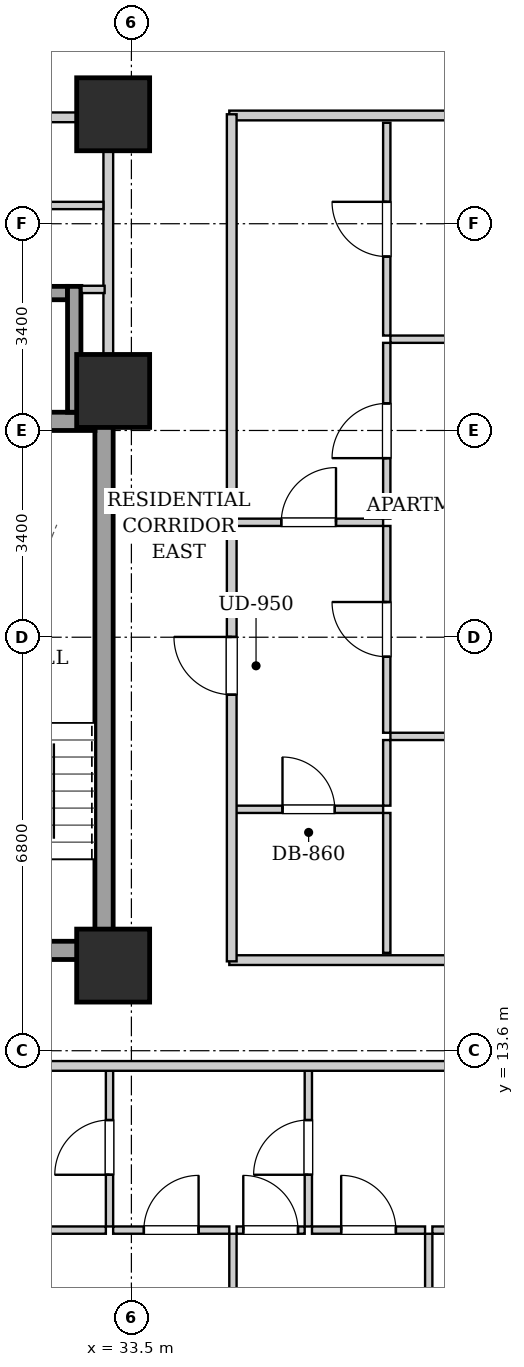
"""IFC4 building model, lengths in metres.
Left out: names, types, materials, properties, quantities, classifications, styles, units other than length and angle.
Written with IfcOpenShell. Run it as: python <this file> out.ifc"""

import sys

from ifc_helpers import new_model, si_unit, direction, frame, frame_2d, origin, origin_2d, place, context, subcontext, project, spatial, rectangle, extrude, element, fill, save


model = new_model("IFC4")
c1 = context("Model", 3, precision=1e-05, world=origin(), true_north=direction((0.0, 1.0)))
c2 = subcontext(c1, "Body", "Model", "MODEL_VIEW")
j1 = project(units=[si_unit("LENGTHUNIT", "METRE"), si_unit("PLANEANGLEUNIT", "RADIAN")], contexts=[c1])
p1 = place(None, origin())
s1 = spatial("IfcSite", under=j1, at=p1, CompositionType="ELEMENT")
p2 = place(p1, origin())
s2 = spatial("IfcBuilding", under=s1, at=p2, CompositionType="ELEMENT")
p3 = place(p2, frame((0.0, 0.0, 38.6)))
s3 = spatial("IfcBuildingStorey", under=s2, at=p3, CompositionType="ELEMENT", Elevation=38.6)
for number, where, z_axis, x_axis in (
    (1, (33.2, 15.0, 0.0), (0.0, 0.0, 1.0), (1.0, 0.0, 0.0)),
    (2, (33.2, 29.0, 0.0), (0.0, 0.0, 1.0), (1.0, 0.0, 0.0)),
    (3, (33.2, 24.45, 0.0), (0.0, 0.0, 1.0), (1.0, 0.0, 0.0)),
):
    element("IfcColumn", number, at=place(p3, frame(where, z_axis=z_axis, x_axis=x_axis)), inside=s3, PredefinedType="COLUMN", context=c2, shape_type="SweptSolid", body=[
        extrude(rectangle(XDim=1.2, YDim=1.2, at=origin_2d()), origin(), (0.0, 0.0, 1.0), 3.2),
    ])
p4 = place(p3, frame((33.05, 15.1, 0.0), z_axis=(0.0, 0.0, 1.0), x_axis=(0.0, 1.0, 0.0)))
e4 = element("IfcWall", 4, at=p4, inside=s3, PredefinedType="SHEAR", context=c2, shape_type="SweptSolid", body=[
    extrude(rectangle(XDim=9.0, YDim=0.3, at=frame_2d((4.5, 0.0))), origin(), (0.0, 0.0, 1.0), 2.94),
])
p5 = place(p3, frame((30.05, 23.95, 0.0), z_axis=(0.0, 0.0, 1.0), x_axis=(1.0, 0.0, 0.0)))
e5 = element("IfcWall", 5, at=p5, inside=s3, PredefinedType="SHEAR", context=c2, shape_type="SweptSolid", body=[
    extrude(rectangle(XDim=2.85, YDim=0.3, at=frame_2d((1.425, 0.0))), origin(), (0.0, 0.0, 1.0), 2.94),
])
p6 = place(p3, frame((30.05, 15.25, 0.0), z_axis=(0.0, 0.0, 1.0), x_axis=(1.0, 0.0, 0.0)))
e6 = element("IfcWall", 6, at=p6, inside=s3, PredefinedType="SHEAR", context=c2, shape_type="SweptSolid", body=[
    extrude(rectangle(XDim=2.85, YDim=0.3, at=frame_2d((1.425, 0.0))), origin(), (0.0, 0.0, 1.0), 2.94),
])
p7 = place(p6, frame((0.86, 0.0, 0.0)))
e7 = element("IfcOpeningElement", 7, at=p7, cuts=e6, PredefinedType="OPENING", context=c2, shape_type="SweptSolid", body=[
    extrude(rectangle(XDim=1.1, YDim=2.05, at=frame_2d((0.55, 1.025))), frame((0.0, 0.16, 0.0), z_axis=(0.0, -1.0, 0.0), x_axis=(1.0, 0.0, 0.0)), (0.0, 0.0, 1.0), 0.32),
])
p8 = place(p3, frame((30.55, 26.06, 0.0), z_axis=(0.0, 0.0, 1.0), x_axis=(1.0, 0.0, 0.0)))
e8 = element("IfcWall", 8, at=p8, inside=s3, PredefinedType="SHEAR", context=c2, shape_type="SweptSolid", body=[
    extrude(rectangle(XDim=1.9, YDim=0.22, at=frame_2d((0.95, 0.0))), origin(), (0.0, 0.0, 1.0), 2.94),
])
p9 = place(p3, frame((32.56, 24.1, 0.0), z_axis=(0.0, 0.0, 1.0), x_axis=(0.0, 1.0, 0.0)))
e9 = element("IfcWall", 9, at=p9, inside=s3, PredefinedType="SHEAR", context=c2, shape_type="SweptSolid", body=[
    extrude(rectangle(XDim=2.07, YDim=0.22, at=frame_2d((1.035, 0.0))), origin(), (0.0, 0.0, 1.0), 2.94),
])
p10 = place(p3, frame((33.12, 24.12, 0.0), z_axis=(0.0, 0.0, 1.0), x_axis=(0.0, 1.0, 0.0)))
e10 = element("IfcWall", 10, at=p10, inside=s3, PredefinedType="PARTITIONING", context=c2, shape_type="SweptSolid", body=[
    extrude(rectangle(XDim=4.76, YDim=0.16, at=frame_2d((2.38, 0.0))), origin(), (0.0, 0.0, 1.0), 2.275),
])
p11 = place(p3, frame((32.68, 26.12, 0.0), z_axis=(0.0, 0.0, 1.0), x_axis=(1.0, 0.0, 0.0)))
e11 = element("IfcWall", 11, at=p11, inside=s3, PredefinedType="PARTITIONING", context=c2, shape_type="SweptSolid", body=[
    extrude(rectangle(XDim=0.38, YDim=0.12, at=frame_2d((0.19, 0.0))), origin(), (0.0, 0.0, 1.0), 2.94),
])
p12 = place(p3, frame((30.16, 27.5, 0.0), z_axis=(0.0, 0.0, 1.0), x_axis=(1.0, 0.0, 0.0)))
e12 = element("IfcWall", 12, at=p12, inside=s3, PredefinedType="PARTITIONING", context=c2, shape_type="SweptSolid", body=[
    extrude(rectangle(XDim=2.88, YDim=0.12, at=frame_2d((1.44, 0.0))), origin(), (0.0, 0.0, 1.0), 2.94),
])
p13 = place(p12, frame((0.97, 0.0, 0.0)))
e13 = element("IfcOpeningElement", 13, at=p13, cuts=e12, PredefinedType="OPENING", context=c2, shape_type="SweptSolid", body=[
    extrude(rectangle(XDim=0.86, YDim=2.05, at=frame_2d((0.43, 1.025))), frame((0.0, 0.07, 0.0), z_axis=(0.0, -1.0, 0.0), x_axis=(1.0, 0.0, 0.0)), (0.0, 0.0, 1.0), 0.14),
])
p14 = place(p3, frame((30.08, 28.95, 0.0), z_axis=(0.0, 0.0, 1.0), x_axis=(1.0, 0.0, 0.0)))
e14 = element("IfcWall", 14, at=p14, inside=s3, PredefinedType="PARTITIONING", context=c2, shape_type="SweptSolid", body=[
    extrude(rectangle(XDim=2.96, YDim=0.16, at=frame_2d((1.48, 0.0))), origin(), (0.0, 0.0, 1.0), 2.94),
])
p15 = place(p14, frame((1.045, 0.0, 0.0)))
e15 = element("IfcOpeningElement", 15, at=p15, cuts=e14, PredefinedType="OPENING", context=c2, shape_type="SweptSolid", body=[
    extrude(rectangle(XDim=0.86, YDim=2.05, at=frame_2d((0.43, 1.025))), frame((0.0, 0.09, 0.0), z_axis=(0.0, -1.0, 0.0), x_axis=(1.0, 0.0, 0.0)), (0.0, 0.0, 1.0), 0.18),
])
for number, where, z_axis, x_axis in (
    (16, (35.11, 15.09, 0.0), (0.0, 0.0, 1.0), (1.0, 0.0, 0.0)),
    (17, (35.11, 28.98, 0.0), (0.0, 0.0, 1.0), (1.0, 0.0, 0.0)),
):
    element("IfcWall", number, at=place(p3, frame(where, z_axis=z_axis, x_axis=x_axis)), inside=s3, PredefinedType="PARTITIONING", context=c2, shape_type="SweptSolid", body=[
        extrude(rectangle(XDim=11.11, YDim=0.16, at=frame_2d((5.555, 0.0))), origin(), (0.0, 0.0, 1.0), 2.155),
    ])
p16 = place(p3, frame((33.14, 10.71, 0.0), z_axis=(0.0, 0.0, 1.0), x_axis=(0.0, 1.0, 0.0)))
e18 = element("IfcWall", 18, at=p16, inside=s3, PredefinedType="PARTITIONING", context=c2, shape_type="SweptSolid", body=[
    extrude(rectangle(XDim=2.6, YDim=0.12, at=frame_2d((1.3, 0.0))), origin(), (0.0, 0.0, 1.0), 2.155),
])
p17 = place(p16, frame((0.85, 0.0, 0.0)))
e19 = element("IfcOpeningElement", 19, at=p17, cuts=e18, PredefinedType="OPENING", context=c2, shape_type="SweptSolid", body=[
    extrude(rectangle(XDim=0.9, YDim=2.05, at=frame_2d((0.45, 1.025))), frame((0.0, 0.07, 0.0), z_axis=(0.0, -1.0, 0.0), x_axis=(1.0, 0.0, 0.0)), (0.0, 0.0, 1.0), 0.14),
])
p18 = place(p3, frame((32.01, 10.65, 0.0), z_axis=(0.0, 0.0, 1.0), x_axis=(1.0, 0.0, 0.0)))
e20 = element("IfcWall", 20, at=p18, inside=s3, PredefinedType="PARTITIONING", context=c2, shape_type="SweptSolid", body=[
    extrude(rectangle(XDim=1.07, YDim=0.12, at=frame_2d((0.535, 0.0))), origin(), (0.0, 0.0, 1.0), 2.94),
])
p19 = place(p3, frame((36.41, 10.71, 0.0), z_axis=(0.0, 0.0, 1.0), x_axis=(0.0, 1.0, 0.0)))
e21 = element("IfcWall", 21, at=p19, inside=s3, PredefinedType="PARTITIONING", context=c2, shape_type="SweptSolid", body=[
    extrude(rectangle(XDim=2.6, YDim=0.12, at=frame_2d((1.3, 0.0))), origin(), (0.0, 0.0, 1.0), 2.94),
])
p20 = place(p19, frame((0.85, 0.0, 0.0)))
e22 = element("IfcOpeningElement", 22, at=p20, cuts=e21, PredefinedType="OPENING", context=c2, shape_type="SweptSolid", body=[
    extrude(rectangle(XDim=0.9, YDim=2.05, at=frame_2d((0.45, 1.025))), frame((0.0, 0.07, 0.0), z_axis=(0.0, -1.0, 0.0), x_axis=(1.0, 0.0, 0.0)), (0.0, 0.0, 1.0), 0.14),
])
p21 = place(p3, frame((33.2, 10.65, 0.0), z_axis=(0.0, 0.0, 1.0), x_axis=(1.0, 0.0, 0.0)))
e23 = element("IfcWall", 23, at=p21, inside=s3, PredefinedType="PARTITIONING", context=c2, shape_type="SweptSolid", body=[
    extrude(rectangle(XDim=1.91, YDim=0.12, at=frame_2d((0.955, 0.0))), origin(), (0.0, 0.0, 1.0), 2.94),
])
p22 = place(p21, frame((0.505, 0.0, 0.0)))
e24 = element("IfcOpeningElement", 24, at=p22, cuts=e23, PredefinedType="OPENING", context=c2, shape_type="SweptSolid", body=[
    extrude(rectangle(XDim=0.9, YDim=2.05, at=frame_2d((0.45, 1.025))), frame((0.0, 0.07, 0.0), z_axis=(0.0, -1.0, 0.0), x_axis=(1.0, 0.0, 0.0)), (0.0, 0.0, 1.0), 0.14),
])
p23 = place(p3, frame((35.23, 10.65, 0.0), z_axis=(0.0, 0.0, 1.0), x_axis=(1.0, 0.0, 0.0)))
e25 = element("IfcWall", 25, at=p23, inside=s3, PredefinedType="PARTITIONING", context=c2, shape_type="SweptSolid", body=[
    extrude(rectangle(XDim=1.12, YDim=0.12, at=frame_2d((0.56, 0.0))), origin(), (0.0, 0.0, 1.0), 2.94),
])
p24 = place(p23, frame((0.11, 0.0, 0.0)))
e26 = element("IfcOpeningElement", 26, at=p24, cuts=e25, PredefinedType="OPENING", context=c2, shape_type="SweptSolid", body=[
    extrude(rectangle(XDim=0.9, YDim=2.05, at=frame_2d((0.45, 1.025))), frame((0.0, 0.07, 0.0), z_axis=(0.0, -1.0, 0.0), x_axis=(1.0, 0.0, 0.0)), (0.0, 0.0, 1.0), 0.14),
])
p25 = place(p3, frame((36.47, 10.65, 0.0), z_axis=(0.0, 0.0, 1.0), x_axis=(1.0, 0.0, 0.0)))
e27 = element("IfcWall", 27, at=p25, inside=s3, PredefinedType="PARTITIONING", context=c2, shape_type="SweptSolid", body=[
    extrude(rectangle(XDim=1.86, YDim=0.12, at=frame_2d((0.93, 0.0))), origin(), (0.0, 0.0, 1.0), 2.94),
])
p26 = place(p25, frame((0.48, 0.0, 0.0)))
e28 = element("IfcOpeningElement", 28, at=p26, cuts=e27, PredefinedType="OPENING", context=c2, shape_type="SweptSolid", body=[
    extrude(rectangle(XDim=0.9, YDim=2.05, at=frame_2d((0.45, 1.025))), frame((0.0, 0.07, 0.0), z_axis=(0.0, -1.0, 0.0), x_axis=(1.0, 0.0, 0.0)), (0.0, 0.0, 1.0), 0.14),
])
p27 = place(p3, frame((38.45, 10.65, 0.0), z_axis=(0.0, 0.0, 1.0), x_axis=(1.0, 0.0, 0.0)))
e29 = element("IfcWall", 29, at=p27, inside=s3, PredefinedType="PARTITIONING", context=c2, shape_type="SweptSolid", body=[
    extrude(rectangle(XDim=1.62, YDim=0.12, at=frame_2d((0.81, 0.0))), origin(), (0.0, 0.0, 1.0), 2.94),
])
p28 = place(p27, frame((0.36, 0.0, 0.0)))
e30 = element("IfcOpeningElement", 30, at=p28, cuts=e29, PredefinedType="OPENING", context=c2, shape_type="SweptSolid", body=[
    extrude(rectangle(XDim=0.9, YDim=2.05, at=frame_2d((0.45, 1.025))), frame((0.0, 0.07, 0.0), z_axis=(0.0, -1.0, 0.0), x_axis=(1.0, 0.0, 0.0)), (0.0, 0.0, 1.0), 0.14),
])
p29 = place(p3, frame((35.17, 0.28, 0.0), z_axis=(0.0, 0.0, 1.0), x_axis=(0.0, 1.0, 0.0)))
e31 = element("IfcWall", 31, at=p29, inside=s3, PredefinedType="PARTITIONING", context=c2, shape_type="SweptSolid", body=[
    extrude(rectangle(XDim=10.31, YDim=0.12, at=frame_2d((5.155, 0.0))), origin(), (0.0, 0.0, 1.0), 2.94),
])
p30 = place(p29, frame((4.69, 0.0, 0.0)))
e32 = element("IfcOpeningElement", 32, at=p30, cuts=e31, PredefinedType="OPENING", context=c2, shape_type="SweptSolid", body=[
    extrude(rectangle(XDim=0.9, YDim=2.05, at=frame_2d((0.45, 1.025))), frame((0.0, 0.07, 0.0), z_axis=(0.0, -1.0, 0.0), x_axis=(1.0, 0.0, 0.0)), (0.0, 0.0, 1.0), 0.14),
])
p31 = place(p3, frame((38.39, 0.28, 0.0), z_axis=(0.0, 0.0, 1.0), x_axis=(0.0, 1.0, 0.0)))
e33 = element("IfcWall", 33, at=p31, inside=s3, PredefinedType="PARTITIONING", context=c2, shape_type="SweptSolid", body=[
    extrude(rectangle(XDim=10.31, YDim=0.12, at=frame_2d((5.155, 0.0))), origin(), (0.0, 0.0, 1.0), 2.94),
])
p32 = place(p31, frame((4.69, 0.0, 0.0)))
e34 = element("IfcOpeningElement", 34, at=p32, cuts=e33, PredefinedType="OPENING", context=c2, shape_type="SweptSolid", body=[
    extrude(rectangle(XDim=0.9, YDim=2.05, at=frame_2d((0.45, 1.025))), frame((0.0, 0.07, 0.0), z_axis=(0.0, -1.0, 0.0), x_axis=(1.0, 0.0, 0.0)), (0.0, 0.0, 1.0), 0.14),
])
p33 = place(p3, frame((35.19, 22.29, 0.0), z_axis=(0.0, 0.0, 1.0), x_axis=(1.0, 0.0, 0.0)))
e35 = element("IfcWall", 35, at=p33, inside=s3, PredefinedType="PARTITIONING", context=c2, shape_type="SweptSolid", body=[
    extrude(rectangle(XDim=2.45, YDim=0.12, at=frame_2d((1.225, 0.0))), origin(), (0.0, 0.0, 1.0), 2.94),
])
p34 = place(p33, frame((0.775, 0.0, 0.0)))
e36 = element("IfcOpeningElement", 36, at=p34, cuts=e35, PredefinedType="OPENING", context=c2, shape_type="SweptSolid", body=[
    extrude(rectangle(XDim=0.9, YDim=2.05, at=frame_2d((0.45, 1.025))), frame((0.0, 0.07, 0.0), z_axis=(0.0, -1.0, 0.0), x_axis=(1.0, 0.0, 0.0)), (0.0, 0.0, 1.0), 0.14),
])
p35 = place(p3, frame((37.7, 22.35, 0.0), z_axis=(0.0, 0.0, 1.0), x_axis=(0.0, 1.0, 0.0)))
e37 = element("IfcWall", 37, at=p35, inside=s3, PredefinedType="PARTITIONING", context=c2, shape_type="SweptSolid", body=[
    extrude(rectangle(XDim=2.891, YDim=0.12, at=frame_2d((1.445, 0.0))), origin(), (0.0, 0.0, 1.0), 2.94),
])
p36 = place(p35, frame((0.995, 0.0, 0.0)))
e38 = element("IfcOpeningElement", 38, at=p36, cuts=e37, PredefinedType="OPENING", context=c2, shape_type="SweptSolid", body=[
    extrude(rectangle(XDim=0.9, YDim=2.05, at=frame_2d((0.45, 1.025))), frame((0.0, 0.07, 0.0), z_axis=(0.0, -1.0, 0.0), x_axis=(1.0, 0.0, 0.0)), (0.0, 0.0, 1.0), 0.14),
])
p37 = place(p3, frame((37.7, 25.361, 0.0), z_axis=(0.0, 0.0, 1.0), x_axis=(0.0, 1.0, 0.0)))
e39 = element("IfcWall", 39, at=p37, inside=s3, PredefinedType="PARTITIONING", context=c2, shape_type="SweptSolid", body=[
    extrude(rectangle(XDim=3.499, YDim=0.12, at=frame_2d((1.75, 0.0))), origin(), (0.0, 0.0, 1.0), 2.94),
])
p38 = place(p37, frame((1.299, 0.0, 0.0)))
e40 = element("IfcOpeningElement", 40, at=p38, cuts=e39, PredefinedType="OPENING", context=c2, shape_type="SweptSolid", body=[
    extrude(rectangle(XDim=0.9, YDim=2.05, at=frame_2d((0.45, 1.025))), frame((0.0, 0.07, 0.0), z_axis=(0.0, -1.0, 0.0), x_axis=(1.0, 0.0, 0.0)), (0.0, 0.0, 1.0), 0.14),
])
p39 = place(p3, frame((35.19, 17.57, 0.0), z_axis=(0.0, 0.0, 1.0), x_axis=(1.0, 0.0, 0.0)))
e41 = element("IfcWall", 41, at=p39, inside=s3, PredefinedType="PARTITIONING", context=c2, shape_type="SweptSolid", body=[
    extrude(rectangle(XDim=2.45, YDim=0.12, at=frame_2d((1.225, 0.0))), origin(), (0.0, 0.0, 1.0), 2.94),
])
p40 = place(p39, frame((0.795, 0.0, 0.0)))
e42 = element("IfcOpeningElement", 42, at=p40, cuts=e41, PredefinedType="OPENING", context=c2, shape_type="SweptSolid", body=[
    extrude(rectangle(XDim=0.86, YDim=2.05, at=frame_2d((0.43, 1.025))), frame((0.0, 0.07, 0.0), z_axis=(0.0, -1.0, 0.0), x_axis=(1.0, 0.0, 0.0)), (0.0, 0.0, 1.0), 0.14),
])
p41 = place(p3, frame((37.7, 15.21, 0.0), z_axis=(0.0, 0.0, 1.0), x_axis=(0.0, 1.0, 0.0)))
e43 = element("IfcWall", 43, at=p41, inside=s3, PredefinedType="PARTITIONING", context=c2, shape_type="SweptSolid", body=[
    extrude(rectangle(XDim=2.3, YDim=0.12, at=frame_2d((1.15, 0.0))), origin(), (0.0, 0.0, 1.0), 2.94),
])
p42 = place(p3, frame((37.7, 17.63, 0.0), z_axis=(0.0, 0.0, 1.0), x_axis=(0.0, 1.0, 0.0)))
e44 = element("IfcWall", 44, at=p42, inside=s3, PredefinedType="PARTITIONING", context=c2, shape_type="SweptSolid", body=[
    extrude(rectangle(XDim=1.079, YDim=0.12, at=frame_2d((0.54, 0.0))), origin(), (0.0, 0.0, 1.0), 2.94),
])
p43 = place(p3, frame((37.7, 18.829, 0.0), z_axis=(0.0, 0.0, 1.0), x_axis=(0.0, 1.0, 0.0)))
e45 = element("IfcWall", 45, at=p43, inside=s3, PredefinedType="PARTITIONING", context=c2, shape_type="SweptSolid", body=[
    extrude(rectangle(XDim=3.401, YDim=0.12, at=frame_2d((1.7, 0.0))), origin(), (0.0, 0.0, 1.0), 2.94),
])
p44 = place(p43, frame((1.25, 0.0, 0.0)))
e46 = element("IfcOpeningElement", 46, at=p44, cuts=e45, PredefinedType="OPENING", context=c2, shape_type="SweptSolid", body=[
    extrude(rectangle(XDim=0.9, YDim=2.05, at=frame_2d((0.45, 1.025))), frame((0.0, 0.07, 0.0), z_axis=(0.0, -1.0, 0.0), x_axis=(1.0, 0.0, 0.0)), (0.0, 0.0, 1.0), 0.14),
])
p45 = place(p3, frame((37.76, 18.769, 0.0), z_axis=(0.0, 0.0, 1.0), x_axis=(1.0, 0.0, 0.0)))
e47 = element("IfcWall", 47, at=p45, inside=s3, PredefinedType="PARTITIONING", context=c2, shape_type="SweptSolid", body=[
    extrude(rectangle(XDim=8.46, YDim=0.12, at=frame_2d((4.23, 0.0))), origin(), (0.0, 0.0, 1.0), 2.94),
])
p46 = place(p45, frame((3.765, 0.0, 0.0)))
e48 = element("IfcOpeningElement", 48, at=p46, cuts=e47, PredefinedType="OPENING", context=c2, shape_type="SweptSolid", body=[
    extrude(rectangle(XDim=0.9, YDim=2.05, at=frame_2d((0.45, 1.025))), frame((0.0, 0.07, 0.0), z_axis=(0.0, -1.0, 0.0), x_axis=(1.0, 0.0, 0.0)), (0.0, 0.0, 1.0), 0.14),
])
p47 = place(p3, frame((37.76, 25.301, 0.0), z_axis=(0.0, 0.0, 1.0), x_axis=(1.0, 0.0, 0.0)))
e49 = element("IfcWall", 49, at=p47, inside=s3, PredefinedType="PARTITIONING", context=c2, shape_type="SweptSolid", body=[
    extrude(rectangle(XDim=8.46, YDim=0.12, at=frame_2d((4.23, 0.0))), origin(), (0.0, 0.0, 1.0), 2.94),
])
p48 = place(p47, frame((3.765, 0.0, 0.0)))
e50 = element("IfcOpeningElement", 50, at=p48, cuts=e49, PredefinedType="OPENING", context=c2, shape_type="SweptSolid", body=[
    extrude(rectangle(XDim=0.9, YDim=2.05, at=frame_2d((0.45, 1.025))), frame((0.0, 0.07, 0.0), z_axis=(0.0, -1.0, 0.0), x_axis=(1.0, 0.0, 0.0)), (0.0, 0.0, 1.0), 0.14),
])
p49 = place(p3, frame((10.05, 13.35, 0.0), z_axis=(0.0, 0.0, 1.0), x_axis=(1.0, 0.0, 0.0)))
e51 = element("IfcWall", 51, at=p49, inside=s3, PredefinedType="PARTITIONING", context=c2, shape_type="SweptSolid", body=[
    extrude(rectangle(XDim=33.9, YDim=0.16, at=frame_2d((16.95, 0.0))), origin(), (0.0, 0.0, 1.0), 2.94),
])
p50 = place(p49, frame((3.8, 0.0, 0.0)))
e52 = element("IfcOpeningElement", 52, at=p50, cuts=e51, PredefinedType="OPENING", context=c2, shape_type="SweptSolid", body=[
    extrude(rectangle(XDim=0.95, YDim=2.1, at=frame_2d((0.475, 1.05))), frame((0.0, 0.09, 0.0), z_axis=(0.0, -1.0, 0.0), x_axis=(1.0, 0.0, 0.0)), (0.0, 0.0, 1.0), 0.18),
])
p51 = place(p49, frame((13.345, 0.0, 0.0)))
e53 = element("IfcOpeningElement", 53, at=p51, cuts=e51, PredefinedType="OPENING", context=c2, shape_type="SweptSolid", body=[
    extrude(rectangle(XDim=0.95, YDim=2.1, at=frame_2d((0.475, 1.05))), frame((0.0, 0.09, 0.0), z_axis=(0.0, -1.0, 0.0), x_axis=(1.0, 0.0, 0.0)), (0.0, 0.0, 1.0), 0.18),
])
p52 = place(p3, frame((35.15, 15.07, 0.0), z_axis=(0.0, 0.0, 1.0), x_axis=(0.0, 1.0, 0.0)))
e54 = element("IfcWall", 54, at=p52, inside=s3, PredefinedType="PARTITIONING", context=c2, shape_type="SweptSolid", body=[
    extrude(rectangle(XDim=13.93, YDim=0.16, at=frame_2d((6.965, 0.0))), origin(), (0.0, 0.0, 1.0), 2.94),
])
p53 = place(p52, frame((4.385, 0.0, 0.0)))
e55 = element("IfcOpeningElement", 55, at=p53, cuts=e54, PredefinedType="OPENING", context=c2, shape_type="SweptSolid", body=[
    extrude(rectangle(XDim=0.95, YDim=2.1, at=frame_2d((0.475, 1.05))), frame((0.0, 0.09, 0.0), z_axis=(0.0, -1.0, 0.0), x_axis=(1.0, 0.0, 0.0)), (0.0, 0.0, 1.0), 0.18),
])
p54 = place(p17, origin())
e56 = element("IfcDoor", 56, at=p54, inside=s3, OperationType="SINGLE_SWING_LEFT", PredefinedType="DOOR", context=c2, shape_type="SweptSolid", body=[
    extrude(rectangle(XDim=0.9, YDim=2.05, at=frame_2d((0.45, 1.025))), frame((0.0, 0.025, 0.0), z_axis=(0.0, -1.0, 0.0), x_axis=(1.0, 0.0, 0.0)), (0.0, 0.0, 1.0), 0.05),
])
fill(e19, e56)
p55 = place(p20, origin())
e57 = element("IfcDoor", 57, at=p55, inside=s3, OperationType="SINGLE_SWING_LEFT", PredefinedType="DOOR", context=c2, shape_type="SweptSolid", body=[
    extrude(rectangle(XDim=0.9, YDim=2.05, at=frame_2d((0.45, 1.025))), frame((0.0, 0.025, 0.0), z_axis=(0.0, -1.0, 0.0), x_axis=(1.0, 0.0, 0.0)), (0.0, 0.0, 1.0), 0.05),
])
fill(e22, e57)
p56 = place(p22, origin())
e58 = element("IfcDoor", 58, at=p56, inside=s3, OperationType="SINGLE_SWING_RIGHT", PredefinedType="DOOR", context=c2, shape_type="SweptSolid", body=[
    extrude(rectangle(XDim=0.9, YDim=2.05, at=frame_2d((0.45, 1.025))), frame((0.0, 0.025, 0.0), z_axis=(0.0, -1.0, 0.0), x_axis=(1.0, 0.0, 0.0)), (0.0, 0.0, 1.0), 0.05),
])
fill(e24, e58)
p57 = place(p24, origin())
e59 = element("IfcDoor", 59, at=p57, inside=s3, OperationType="SINGLE_SWING_LEFT", PredefinedType="DOOR", context=c2, shape_type="SweptSolid", body=[
    extrude(rectangle(XDim=0.9, YDim=2.05, at=frame_2d((0.45, 1.025))), frame((0.0, 0.025, 0.0), z_axis=(0.0, -1.0, 0.0), x_axis=(1.0, 0.0, 0.0)), (0.0, 0.0, 1.0), 0.05),
])
fill(e26, e59)
p58 = place(p26, origin())
e60 = element("IfcDoor", 60, at=p58, inside=s3, OperationType="SINGLE_SWING_LEFT", PredefinedType="DOOR", context=c2, shape_type="SweptSolid", body=[
    extrude(rectangle(XDim=0.9, YDim=2.05, at=frame_2d((0.45, 1.025))), frame((0.0, 0.025, 0.0), z_axis=(0.0, -1.0, 0.0), x_axis=(1.0, 0.0, 0.0)), (0.0, 0.0, 1.0), 0.05),
])
fill(e28, e60)
p59 = place(p34, origin())
e61 = element("IfcDoor", 61, at=p59, inside=s3, OperationType="SINGLE_SWING_RIGHT", PredefinedType="DOOR", context=c2, shape_type="SweptSolid", body=[
    extrude(rectangle(XDim=0.9, YDim=2.05, at=frame_2d((0.45, 1.025))), frame((0.0, 0.025, 0.0), z_axis=(0.0, -1.0, 0.0), x_axis=(1.0, 0.0, 0.0)), (0.0, 0.0, 1.0), 0.05),
])
fill(e36, e61)
p60 = place(p36, origin())
e62 = element("IfcDoor", 62, at=p60, inside=s3, OperationType="SINGLE_SWING_LEFT", PredefinedType="DOOR", context=c2, shape_type="SweptSolid", body=[
    extrude(rectangle(XDim=0.9, YDim=2.05, at=frame_2d((0.45, 1.025))), frame((0.0, 0.025, 0.0), z_axis=(0.0, -1.0, 0.0), x_axis=(1.0, 0.0, 0.0)), (0.0, 0.0, 1.0), 0.05),
])
fill(e38, e62)
p61 = place(p38, origin())
e63 = element("IfcDoor", 63, at=p61, inside=s3, OperationType="SINGLE_SWING_RIGHT", PredefinedType="DOOR", context=c2, shape_type="SweptSolid", body=[
    extrude(rectangle(XDim=0.9, YDim=2.05, at=frame_2d((0.45, 1.025))), frame((0.0, 0.025, 0.0), z_axis=(0.0, -1.0, 0.0), x_axis=(1.0, 0.0, 0.0)), (0.0, 0.0, 1.0), 0.05),
])
fill(e40, e63)
p62 = place(p40, origin())
e64 = element("IfcDoor", 64, at=p62, inside=s3, OperationType="SINGLE_SWING_LEFT", PredefinedType="DOOR", context=c2, shape_type="SweptSolid", body=[
    extrude(rectangle(XDim=0.86, YDim=2.05, at=frame_2d((0.43, 1.025))), frame((0.0, 0.025, 0.0), z_axis=(0.0, -1.0, 0.0), x_axis=(1.0, 0.0, 0.0)), (0.0, 0.0, 1.0), 0.05),
])
fill(e42, e64)
p63 = place(p44, origin())
e65 = element("IfcDoor", 65, at=p63, inside=s3, OperationType="SINGLE_SWING_RIGHT", PredefinedType="DOOR", context=c2, shape_type="SweptSolid", body=[
    extrude(rectangle(XDim=0.9, YDim=2.05, at=frame_2d((0.45, 1.025))), frame((0.0, 0.025, 0.0), z_axis=(0.0, -1.0, 0.0), x_axis=(1.0, 0.0, 0.0)), (0.0, 0.0, 1.0), 0.05),
])
fill(e46, e65)
p64 = place(p53, origin())
e66 = element("IfcDoor", 66, at=p64, inside=s3, OperationType="SINGLE_SWING_RIGHT", PredefinedType="DOOR", context=c2, shape_type="SweptSolid", body=[
    extrude(rectangle(XDim=0.95, YDim=2.1, at=frame_2d((0.475, 1.05))), frame((0.0, 0.025, 0.0), z_axis=(0.0, -1.0, 0.0), x_axis=(1.0, 0.0, 0.0)), (0.0, 0.0, 1.0), 0.05),
])
fill(e55, e66)
save(model, sys.argv[1])
